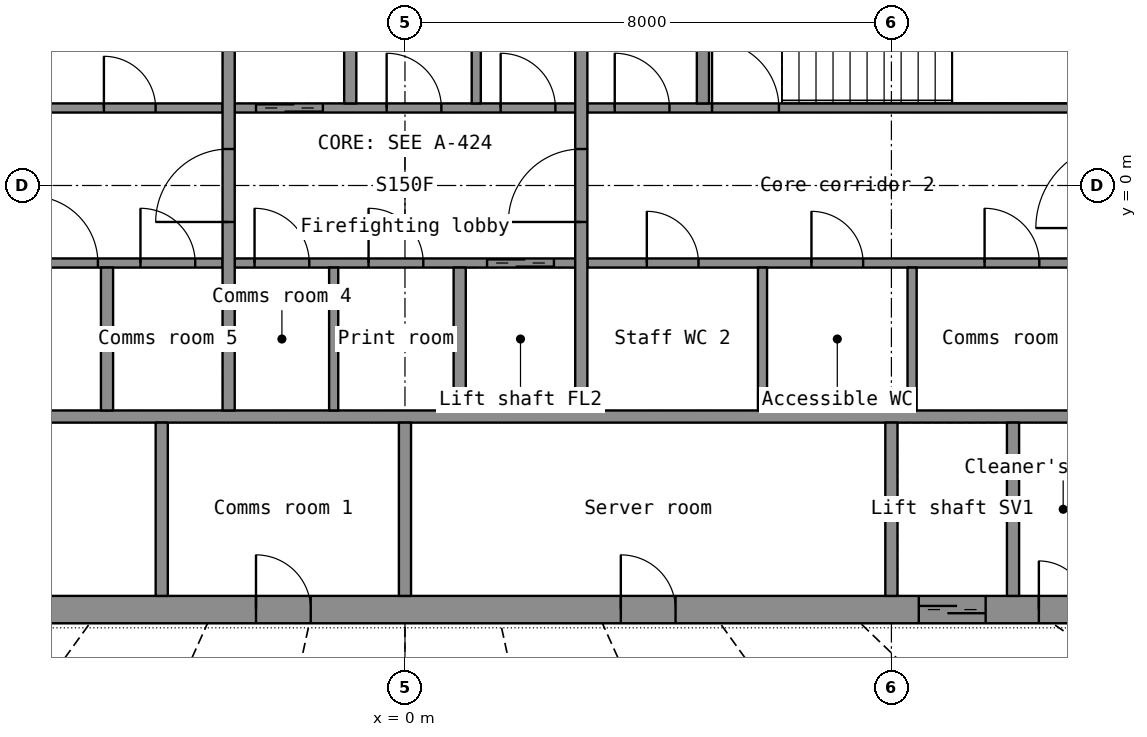
"""IFC4 building model, lengths in metres.
Left out: names, types, materials, properties, quantities, classifications, styles, units other than length and angle.
Written with IfcOpenShell. Run it as: python <this file> out.ifc"""

import sys

from ifc_helpers import new_model, si_unit, direction, frame, frame_2d, origin, place, context, subcontext, project, spatial, rectangle, extrude, element, fill, save


model = new_model("IFC4")
c1 = context("Model", 3, precision=1e-05, world=origin(), true_north=direction((0.0, 1.0)))
c2 = subcontext(c1, "Body", "Model", "MODEL_VIEW")
j1 = project(units=[si_unit("LENGTHUNIT", "METRE"), si_unit("PLANEANGLEUNIT", "RADIAN")], contexts=[c1])
p1 = place(None, origin())
s1 = spatial("IfcSite", under=j1, at=p1, CompositionType="ELEMENT")
p2 = place(p1, origin())
s2 = spatial("IfcBuilding", under=s1, at=p2, CompositionType="ELEMENT")
p3 = place(p2, frame((0.0, 0.0, 186.7)))
s3 = spatial("IfcBuildingStorey", under=s2, at=p3, CompositionType="ELEMENT", Elevation=186.7)
p4 = place(p3, frame((-11.55, -6.975, 0.0), z_axis=(0.0, 0.0, 1.0), x_axis=(1.0, 0.0, 0.0)))
e1 = element("IfcWall", 1, at=p4, inside=s3, PredefinedType="SHEAR", context=c2, shape_type="SweptSolid", body=[
    extrude(rectangle(XDim=23.1, YDim=0.45, at=frame_2d((11.55, 0.0))), origin(), (0.0, 0.0, 1.0), 3.3),
])
p5 = place(p4, frame((20.0, 0.0, 0.0)))
e2 = element("IfcOpeningElement", 2, at=p5, cuts=e1, PredefinedType="OPENING", context=c2, shape_type="SweptSolid", body=[
    extrude(rectangle(XDim=1.1, YDim=2.2, at=frame_2d((0.55, 1.1))), frame((0.0, 0.235, 0.0), z_axis=(0.0, -1.0, 0.0), x_axis=(1.0, 0.0, 0.0)), (0.0, 0.0, 1.0), 0.47),
])
p6 = place(p4, frame((4.1, 0.0, 0.0)))
e3 = element("IfcOpeningElement", 3, at=p6, cuts=e1, PredefinedType="OPENING", context=c2, shape_type="SweptSolid", body=[
    extrude(rectangle(XDim=0.9, YDim=2.1, at=frame_2d((0.45, 1.05))), frame((0.0, 0.235, 0.0), z_axis=(0.0, -1.0, 0.0), x_axis=(1.0, 0.0, 0.0)), (0.0, 0.0, 1.0), 0.47),
])
p7 = place(p4, frame((9.1, 0.0, 0.0)))
e4 = element("IfcOpeningElement", 4, at=p7, cuts=e1, PredefinedType="OPENING", context=c2, shape_type="SweptSolid", body=[
    extrude(rectangle(XDim=0.9, YDim=2.1, at=frame_2d((0.45, 1.05))), frame((0.0, 0.235, 0.0), z_axis=(0.0, -1.0, 0.0), x_axis=(1.0, 0.0, 0.0)), (0.0, 0.0, 1.0), 0.47),
])
p8 = place(p4, frame((15.1, 0.0, 0.0)))
e5 = element("IfcOpeningElement", 5, at=p8, cuts=e1, PredefinedType="OPENING", context=c2, shape_type="SweptSolid", body=[
    extrude(rectangle(XDim=0.9, YDim=2.1, at=frame_2d((0.45, 1.05))), frame((0.0, 0.235, 0.0), z_axis=(0.0, -1.0, 0.0), x_axis=(1.0, 0.0, 0.0)), (0.0, 0.0, 1.0), 0.47),
])
p9 = place(p4, frame((0.325, 0.0, 0.0)))
e6 = element("IfcOpeningElement", 6, at=p9, cuts=e1, PredefinedType="OPENING", context=c2, shape_type="SweptSolid", body=[
    extrude(rectangle(XDim=0.8, YDim=2.05, at=frame_2d((0.4, 1.025))), frame((0.0, 0.235, 0.0), z_axis=(0.0, -1.0, 0.0), x_axis=(1.0, 0.0, 0.0)), (0.0, 0.0, 1.0), 0.47),
])
p10 = place(p4, frame((21.975, 0.0, 0.0)))
e7 = element("IfcOpeningElement", 7, at=p10, cuts=e1, PredefinedType="OPENING", context=c2, shape_type="SweptSolid", body=[
    extrude(rectangle(XDim=0.8, YDim=2.05, at=frame_2d((0.4, 1.025))), frame((0.0, 0.235, 0.0), z_axis=(0.0, -1.0, 0.0), x_axis=(1.0, 0.0, 0.0)), (0.0, 0.0, 1.0), 0.47),
])
p11 = place(p3, frame((-11.55, -3.8, 0.0), z_axis=(0.0, 0.0, 1.0), x_axis=(1.0, 0.0, 0.0)))
e8 = element("IfcWall", 8, at=p11, inside=s3, PredefinedType="SHEAR", context=c2, shape_type="SweptSolid", body=[
    extrude(rectangle(XDim=23.1, YDim=0.2, at=frame_2d((11.55, 0.0))), origin(), (0.0, 0.0, 1.0), 3.3),
])
for number, where, z_axis, x_axis in (
    (9, (8.0, -6.75, 0.0), (0.0, 0.0, 1.0), (0.0, 1.0, 0.0)),
    (10, (10.0, -6.75, 0.0), (0.0, 0.0, 1.0), (0.0, 1.0, 0.0)),
):
    element("IfcWall", number, at=place(p3, frame(where, z_axis=z_axis, x_axis=x_axis)), inside=s3, PredefinedType="SHEAR", context=c2, shape_type="SweptSolid", body=[
        extrude(rectangle(XDim=2.85, YDim=0.2, at=frame_2d((1.425, 0.0))), origin(), (0.0, 0.0, 1.0), 3.3),
    ])
for number, where, z_axis, x_axis in (
    (11, (-4.0, -6.75, 0.0), (0.0, 0.0, 1.0), (0.0, 1.0, 0.0)),
    (12, (0.0, -6.75, 0.0), (0.0, 0.0, 1.0), (0.0, 1.0, 0.0)),
):
    element("IfcWall", number, at=place(p3, frame(where, z_axis=z_axis, x_axis=x_axis)), inside=s3, PredefinedType="PARTITIONING", context=c2, shape_type="SweptSolid", body=[
        extrude(rectangle(XDim=2.85, YDim=0.2, at=frame_2d((1.425, 0.0))), origin(), (0.0, 0.0, 1.0), 3.3),
    ])
p12 = place(p3, frame((-11.55, -1.275, 0.0), z_axis=(0.0, 0.0, 1.0), x_axis=(1.0, 0.0, 0.0)))
e13 = element("IfcWall", 13, at=p12, inside=s3, PredefinedType="SHEAR", context=c2, shape_type="SweptSolid", body=[
    extrude(rectangle(XDim=8.55, YDim=0.15, at=frame_2d((4.275, 0.0))), origin(), (0.0, 0.0, 1.0), 3.3),
])
p13 = place(p12, frame((5.4, 0.0, 0.0)))
e14 = element("IfcOpeningElement", 14, at=p13, cuts=e13, PredefinedType="OPENING", context=c2, shape_type="SweptSolid", body=[
    extrude(rectangle(XDim=1.1, YDim=2.15, at=frame_2d((0.55, 1.075))), frame((0.0, 0.085, 0.0), z_axis=(0.0, -1.0, 0.0), x_axis=(1.0, 0.0, 0.0)), (0.0, 0.0, 1.0), 0.17),
])
p14 = place(p12, frame((7.2, 0.0, 0.0)))
e15 = element("IfcOpeningElement", 15, at=p14, cuts=e13, PredefinedType="OPENING", context=c2, shape_type="SweptSolid", body=[
    extrude(rectangle(XDim=0.9, YDim=2.1, at=frame_2d((0.45, 1.05))), frame((0.0, 0.085, 0.0), z_axis=(0.0, -1.0, 0.0), x_axis=(1.0, 0.0, 0.0)), (0.0, 0.0, 1.0), 0.17),
])
p15 = place(p3, frame((-2.8, -1.275, 0.0), z_axis=(0.0, 0.0, 1.0), x_axis=(1.0, 0.0, 0.0)))
e16 = element("IfcWall", 16, at=p15, inside=s3, PredefinedType="SHEAR", context=c2, shape_type="SweptSolid", body=[
    extrude(rectangle(XDim=5.6, YDim=0.15, at=frame_2d((2.8, 0.0))), origin(), (0.0, 0.0, 1.0), 3.3),
])
p16 = place(p15, frame((4.15, 0.0, 0.0)))
e17 = element("IfcOpeningElement", 17, at=p16, cuts=e16, PredefinedType="OPENING", context=c2, shape_type="SweptSolid", body=[
    extrude(rectangle(XDim=1.1, YDim=2.2, at=frame_2d((0.55, 1.1))), frame((0.0, 0.085, 0.0), z_axis=(0.0, -1.0, 0.0), x_axis=(1.0, 0.0, 0.0)), (0.0, 0.0, 1.0), 0.17),
])
p17 = place(p15, frame((0.326, 0.0, 0.0)))
e18 = element("IfcOpeningElement", 18, at=p17, cuts=e16, PredefinedType="OPENING", context=c2, shape_type="SweptSolid", body=[
    extrude(rectangle(XDim=0.9, YDim=2.1, at=frame_2d((0.45, 1.05))), frame((0.0, 0.085, 0.0), z_axis=(0.0, -1.0, 0.0), x_axis=(1.0, 0.0, 0.0)), (0.0, 0.0, 1.0), 0.17),
])
p18 = place(p15, frame((2.201, 0.0, 0.0)))
e19 = element("IfcOpeningElement", 19, at=p18, cuts=e16, PredefinedType="OPENING", context=c2, shape_type="SweptSolid", body=[
    extrude(rectangle(XDim=0.9, YDim=2.1, at=frame_2d((0.45, 1.05))), frame((0.0, 0.085, 0.0), z_axis=(0.0, -1.0, 0.0), x_axis=(1.0, 0.0, 0.0)), (0.0, 0.0, 1.0), 0.17),
])
p19 = place(p3, frame((3.0, -1.275, 0.0), z_axis=(0.0, 0.0, 1.0), x_axis=(1.0, 0.0, 0.0)))
e20 = element("IfcWall", 20, at=p19, inside=s3, PredefinedType="PARTITIONING", context=c2, shape_type="SweptSolid", body=[
    extrude(rectangle(XDim=8.55, YDim=0.15, at=frame_2d((4.275, 0.0))), origin(), (0.0, 0.0, 1.0), 3.3),
])
p20 = place(p19, frame((0.978, 0.0, 0.0)))
e21 = element("IfcOpeningElement", 21, at=p20, cuts=e20, PredefinedType="OPENING", context=c2, shape_type="SweptSolid", body=[
    extrude(rectangle(XDim=0.85, YDim=2.1, at=frame_2d((0.425, 1.05))), frame((0.0, 0.085, 0.0), z_axis=(0.0, -1.0, 0.0), x_axis=(1.0, 0.0, 0.0)), (0.0, 0.0, 1.0), 0.17),
])
p21 = place(p19, frame((3.685, 0.0, 0.0)))
e22 = element("IfcOpeningElement", 22, at=p21, cuts=e20, PredefinedType="OPENING", context=c2, shape_type="SweptSolid", body=[
    extrude(rectangle(XDim=0.85, YDim=2.1, at=frame_2d((0.425, 1.05))), frame((0.0, 0.085, 0.0), z_axis=(0.0, -1.0, 0.0), x_axis=(1.0, 0.0, 0.0)), (0.0, 0.0, 1.0), 0.17),
])
p22 = place(p19, frame((6.532, 0.0, 0.0)))
e23 = element("IfcOpeningElement", 23, at=p22, cuts=e20, PredefinedType="OPENING", context=c2, shape_type="SweptSolid", body=[
    extrude(rectangle(XDim=0.9, YDim=2.1, at=frame_2d((0.45, 1.05))), frame((0.0, 0.085, 0.0), z_axis=(0.0, -1.0, 0.0), x_axis=(1.0, 0.0, 0.0)), (0.0, 0.0, 1.0), 0.17),
])
p23 = place(p3, frame((-11.55, 1.275, 0.0), z_axis=(0.0, 0.0, 1.0), x_axis=(1.0, 0.0, 0.0)))
e24 = element("IfcWall", 24, at=p23, inside=s3, PredefinedType="PARTITIONING", context=c2, shape_type="SweptSolid", body=[
    extrude(rectangle(XDim=8.55, YDim=0.15, at=frame_2d((4.275, 0.0))), origin(), (0.0, 0.0, 1.0), 3.3),
])
p24 = place(p23, frame((0.623, 0.0, 0.0)))
e25 = element("IfcOpeningElement", 25, at=p24, cuts=e24, PredefinedType="OPENING", context=c2, shape_type="SweptSolid", body=[
    extrude(rectangle(XDim=0.9, YDim=2.1, at=frame_2d((0.45, 1.05))), frame((0.0, 0.085, 0.0), z_axis=(0.0, -1.0, 0.0), x_axis=(1.0, 0.0, 0.0)), (0.0, 0.0, 1.0), 0.17),
])
p25 = place(p23, frame((3.396, 0.0, 0.0)))
e26 = element("IfcOpeningElement", 26, at=p25, cuts=e24, PredefinedType="OPENING", context=c2, shape_type="SweptSolid", body=[
    extrude(rectangle(XDim=0.85, YDim=2.1, at=frame_2d((0.425, 1.05))), frame((0.0, 0.085, 0.0), z_axis=(0.0, -1.0, 0.0), x_axis=(1.0, 0.0, 0.0)), (0.0, 0.0, 1.0), 0.17),
])
p26 = place(p23, frame((6.599, 0.0, 0.0)))
e27 = element("IfcOpeningElement", 27, at=p26, cuts=e24, PredefinedType="OPENING", context=c2, shape_type="SweptSolid", body=[
    extrude(rectangle(XDim=0.85, YDim=2.1, at=frame_2d((0.425, 1.05))), frame((0.0, 0.085, 0.0), z_axis=(0.0, -1.0, 0.0), x_axis=(1.0, 0.0, 0.0)), (0.0, 0.0, 1.0), 0.17),
])
p27 = place(p3, frame((-2.8, 1.275, 0.0), z_axis=(0.0, 0.0, 1.0), x_axis=(1.0, 0.0, 0.0)))
e28 = element("IfcWall", 28, at=p27, inside=s3, PredefinedType="SHEAR", context=c2, shape_type="SweptSolid", body=[
    extrude(rectangle(XDim=5.6, YDim=0.15, at=frame_2d((2.8, 0.0))), origin(), (0.0, 0.0, 1.0), 3.3),
])
p28 = place(p27, frame((0.35, 0.0, 0.0)))
e29 = element("IfcOpeningElement", 29, at=p28, cuts=e28, PredefinedType="OPENING", context=c2, shape_type="SweptSolid", body=[
    extrude(rectangle(XDim=1.1, YDim=2.2, at=frame_2d((0.55, 1.1))), frame((0.0, 0.085, 0.0), z_axis=(0.0, -1.0, 0.0), x_axis=(1.0, 0.0, 0.0)), (0.0, 0.0, 1.0), 0.17),
])
p29 = place(p27, frame((2.499, 0.0, 0.0)))
e30 = element("IfcOpeningElement", 30, at=p29, cuts=e28, PredefinedType="OPENING", context=c2, shape_type="SweptSolid", body=[
    extrude(rectangle(XDim=0.9, YDim=2.1, at=frame_2d((0.45, 1.05))), frame((0.0, 0.085, 0.0), z_axis=(0.0, -1.0, 0.0), x_axis=(1.0, 0.0, 0.0)), (0.0, 0.0, 1.0), 0.17),
])
p30 = place(p27, frame((4.374, 0.0, 0.0)))
e31 = element("IfcOpeningElement", 31, at=p30, cuts=e28, PredefinedType="OPENING", context=c2, shape_type="SweptSolid", body=[
    extrude(rectangle(XDim=0.9, YDim=2.1, at=frame_2d((0.45, 1.05))), frame((0.0, 0.085, 0.0), z_axis=(0.0, -1.0, 0.0), x_axis=(1.0, 0.0, 0.0)), (0.0, 0.0, 1.0), 0.17),
])
p31 = place(p3, frame((3.0, 1.275, 0.0), z_axis=(0.0, 0.0, 1.0), x_axis=(1.0, 0.0, 0.0)))
e32 = element("IfcWall", 32, at=p31, inside=s3, PredefinedType="SHEAR", context=c2, shape_type="SweptSolid", body=[
    extrude(rectangle(XDim=8.55, YDim=0.15, at=frame_2d((4.275, 0.0))), origin(), (0.0, 0.0, 1.0), 3.3),
])
p32 = place(p31, frame((2.05, 0.0, 0.0)))
e33 = element("IfcOpeningElement", 33, at=p32, cuts=e32, PredefinedType="OPENING", context=c2, shape_type="SweptSolid", body=[
    extrude(rectangle(XDim=1.1, YDim=2.15, at=frame_2d((0.55, 1.075))), frame((0.0, 0.085, 0.0), z_axis=(0.0, -1.0, 0.0), x_axis=(1.0, 0.0, 0.0)), (0.0, 0.0, 1.0), 0.17),
])
p33 = place(p31, frame((0.45, 0.0, 0.0)))
e34 = element("IfcOpeningElement", 34, at=p33, cuts=e32, PredefinedType="OPENING", context=c2, shape_type="SweptSolid", body=[
    extrude(rectangle(XDim=0.9, YDim=2.1, at=frame_2d((0.45, 1.05))), frame((0.0, 0.085, 0.0), z_axis=(0.0, -1.0, 0.0), x_axis=(1.0, 0.0, 0.0)), (0.0, 0.0, 1.0), 0.17),
])
p34 = place(p3, frame((-2.9, -3.7, 0.0), z_axis=(0.0, 0.0, 1.0), x_axis=(0.0, 1.0, 0.0)))
e35 = element("IfcWall", 35, at=p34, inside=s3, PredefinedType="SHEAR", context=c2, shape_type="SweptSolid", body=[
    extrude(rectangle(XDim=7.4, YDim=0.2, at=frame_2d((3.7, 0.0))), origin(), (0.0, 0.0, 1.0), 3.3),
])
p35 = place(p34, frame((3.1, 0.0, 0.0)))
e36 = element("IfcOpeningElement", 36, at=p35, cuts=e35, PredefinedType="OPENING", context=c2, shape_type="SweptSolid", body=[
    extrude(rectangle(XDim=1.2, YDim=2.2, at=frame_2d((0.6, 1.1))), frame((0.0, 0.11, 0.0), z_axis=(0.0, -1.0, 0.0), x_axis=(1.0, 0.0, 0.0)), (0.0, 0.0, 1.0), 0.22),
])
p36 = place(p3, frame((2.9, -3.7, 0.0), z_axis=(0.0, 0.0, 1.0), x_axis=(0.0, 1.0, 0.0)))
e37 = element("IfcWall", 37, at=p36, inside=s3, PredefinedType="SHEAR", context=c2, shape_type="SweptSolid", body=[
    extrude(rectangle(XDim=7.4, YDim=0.2, at=frame_2d((3.7, 0.0))), origin(), (0.0, 0.0, 1.0), 3.3),
])
p37 = place(p36, frame((3.1, 0.0, 0.0)))
e38 = element("IfcOpeningElement", 38, at=p37, cuts=e37, PredefinedType="OPENING", context=c2, shape_type="SweptSolid", body=[
    extrude(rectangle(XDim=1.2, YDim=2.2, at=frame_2d((0.6, 1.1))), frame((0.0, 0.11, 0.0), z_axis=(0.0, -1.0, 0.0), x_axis=(1.0, 0.0, 0.0)), (0.0, 0.0, 1.0), 0.22),
])
for number, where, z_axis, x_axis in (
    (39, (-0.9, 1.35, 0.0), (0.0, 0.0, 1.0), (0.0, 1.0, 0.0)),
    (40, (0.9, -3.7, 0.0), (0.0, 0.0, 1.0), (0.0, 1.0, 0.0)),
    (41, (-4.9, -3.7, 0.0), (0.0, 0.0, 1.0), (0.0, 1.0, 0.0)),
    (42, (4.9, 1.35, 0.0), (0.0, 0.0, 1.0), (0.0, 1.0, 0.0)),
):
    element("IfcWall", number, at=place(p3, frame(where, z_axis=z_axis, x_axis=x_axis)), inside=s3, PredefinedType="SHEAR", context=c2, shape_type="SweptSolid", body=[
        extrude(rectangle(XDim=2.35, YDim=0.2, at=frame_2d((1.175, 0.0))), origin(), (0.0, 0.0, 1.0), 3.3),
    ])
for number, where, z_axis, x_axis in (
    (43, (5.88, -3.7, 0.0), (0.0, 0.0, 1.0), (0.0, 1.0, 0.0)),
    (44, (8.34, -3.7, 0.0), (0.0, 0.0, 1.0), (0.0, 1.0, 0.0)),
    (45, (1.173, 1.35, 0.0), (0.0, 0.0, 1.0), (0.0, 1.0, 0.0)),
    (46, (-1.173, -3.7, 0.0), (0.0, 0.0, 1.0), (0.0, 1.0, 0.0)),
):
    element("IfcWall", number, at=place(p3, frame(where, z_axis=z_axis, x_axis=x_axis)), inside=s3, PredefinedType="PARTITIONING", context=c2, shape_type="SweptSolid", body=[
        extrude(rectangle(XDim=2.35, YDim=0.15, at=frame_2d((1.175, 0.0))), origin(), (0.0, 0.0, 1.0), 3.3),
    ])
p38 = place(p5, origin())
e47 = element("IfcDoor", 47, at=p38, inside=s3, OperationType="DOUBLE_DOOR_SLIDING", PredefinedType="DOOR", context=c2, shape_type="SweptSolid", body=[
    extrude(rectangle(XDim=1.1, YDim=2.2, at=frame_2d((0.55, 1.1))), frame((0.0, 0.025, 0.0), z_axis=(0.0, -1.0, 0.0), x_axis=(1.0, 0.0, 0.0)), (0.0, 0.0, 1.0), 0.05),
])
fill(e2, e47)
p39 = place(p7, origin())
e48 = element("IfcDoor", 48, at=p39, inside=s3, OperationType="SINGLE_SWING_LEFT", PredefinedType="DOOR", context=c2, shape_type="SweptSolid", body=[
    extrude(rectangle(XDim=0.9, YDim=2.1, at=frame_2d((0.45, 1.05))), frame((0.0, 0.025, 0.0), z_axis=(0.0, -1.0, 0.0), x_axis=(1.0, 0.0, 0.0)), (0.0, 0.0, 1.0), 0.05),
])
fill(e4, e48)
p40 = place(p8, origin())
e49 = element("IfcDoor", 49, at=p40, inside=s3, OperationType="SINGLE_SWING_LEFT", PredefinedType="DOOR", context=c2, shape_type="SweptSolid", body=[
    extrude(rectangle(XDim=0.9, YDim=2.1, at=frame_2d((0.45, 1.05))), frame((0.0, 0.025, 0.0), z_axis=(0.0, -1.0, 0.0), x_axis=(1.0, 0.0, 0.0)), (0.0, 0.0, 1.0), 0.05),
])
fill(e5, e49)
p41 = place(p10, origin())
e50 = element("IfcDoor", 50, at=p41, inside=s3, OperationType="SINGLE_SWING_LEFT", PredefinedType="DOOR", context=c2, shape_type="SweptSolid", body=[
    extrude(rectangle(XDim=0.8, YDim=2.05, at=frame_2d((0.4, 1.025))), frame((0.0, 0.025, 0.0), z_axis=(0.0, -1.0, 0.0), x_axis=(1.0, 0.0, 0.0)), (0.0, 0.0, 1.0), 0.05),
])
fill(e7, e50)
p42 = place(p35, origin())
e51 = element("IfcDoor", 51, at=p42, inside=s3, OperationType="SINGLE_SWING_LEFT", PredefinedType="DOOR", context=c2, shape_type="SweptSolid", body=[
    extrude(rectangle(XDim=1.2, YDim=2.2, at=frame_2d((0.6, 1.1))), frame((0.0, 0.025, 0.0), z_axis=(0.0, -1.0, 0.0), x_axis=(1.0, 0.0, 0.0)), (0.0, 0.0, 1.0), 0.05),
])
fill(e36, e51)
p43 = place(p37, origin())
e52 = element("IfcDoor", 52, at=p43, inside=s3, OperationType="SINGLE_SWING_LEFT", PredefinedType="DOOR", context=c2, shape_type="SweptSolid", body=[
    extrude(rectangle(XDim=1.2, YDim=2.2, at=frame_2d((0.6, 1.1))), frame((0.0, 0.025, 0.0), z_axis=(0.0, -1.0, 0.0), x_axis=(1.0, 0.0, 0.0)), (0.0, 0.0, 1.0), 0.05),
])
fill(e38, e52)
p44 = place(p28, origin())
e53 = element("IfcDoor", 53, at=p44, inside=s3, OperationType="DOUBLE_DOOR_SLIDING", PredefinedType="DOOR", context=c2, shape_type="SweptSolid", body=[
    extrude(rectangle(XDim=1.1, YDim=2.2, at=frame_2d((0.55, 1.1))), frame((0.0, 0.025, 0.0), z_axis=(0.0, -1.0, 0.0), x_axis=(1.0, 0.0, 0.0)), (0.0, 0.0, 1.0), 0.05),
])
fill(e29, e53)
p45 = place(p16, origin())
e54 = element("IfcDoor", 54, at=p45, inside=s3, OperationType="DOUBLE_DOOR_SLIDING", PredefinedType="DOOR", context=c2, shape_type="SweptSolid", body=[
    extrude(rectangle(XDim=1.1, YDim=2.2, at=frame_2d((0.55, 1.1))), frame((0.0, 0.025, 0.0), z_axis=(0.0, -1.0, 0.0), x_axis=(1.0, 0.0, 0.0)), (0.0, 0.0, 1.0), 0.05),
])
fill(e17, e54)
p46 = place(p13, origin())
e55 = element("IfcDoor", 55, at=p46, inside=s3, OperationType="SINGLE_SWING_LEFT", PredefinedType="DOOR", context=c2, shape_type="SweptSolid", body=[
    extrude(rectangle(XDim=1.1, YDim=2.15, at=frame_2d((0.55, 1.075))), frame((0.0, 0.025, 0.0), z_axis=(0.0, -1.0, 0.0), x_axis=(1.0, 0.0, 0.0)), (0.0, 0.0, 1.0), 0.05),
])
fill(e14, e55)
p47 = place(p32, origin())
e56 = element("IfcDoor", 56, at=p47, inside=s3, OperationType="SINGLE_SWING_LEFT", PredefinedType="DOOR", context=c2, shape_type="SweptSolid", body=[
    extrude(rectangle(XDim=1.1, YDim=2.15, at=frame_2d((0.55, 1.075))), frame((0.0, 0.025, 0.0), z_axis=(0.0, -1.0, 0.0), x_axis=(1.0, 0.0, 0.0)), (0.0, 0.0, 1.0), 0.05),
])
fill(e33, e56)
p48 = place(p26, origin())
e57 = element("IfcDoor", 57, at=p48, inside=s3, OperationType="SINGLE_SWING_LEFT", PredefinedType="DOOR", context=c2, shape_type="SweptSolid", body=[
    extrude(rectangle(XDim=0.85, YDim=2.1, at=frame_2d((0.425, 1.05))), frame((0.0, 0.025, 0.0), z_axis=(0.0, -1.0, 0.0), x_axis=(1.0, 0.0, 0.0)), (0.0, 0.0, 1.0), 0.05),
])
fill(e27, e57)
p49 = place(p20, origin())
e58 = element("IfcDoor", 58, at=p49, inside=s3, OperationType="SINGLE_SWING_LEFT", PredefinedType="DOOR", context=c2, shape_type="SweptSolid", body=[
    extrude(rectangle(XDim=0.85, YDim=2.1, at=frame_2d((0.425, 1.05))), frame((0.0, 0.025, 0.0), z_axis=(0.0, -1.0, 0.0), x_axis=(1.0, 0.0, 0.0)), (0.0, 0.0, 1.0), 0.05),
])
fill(e21, e58)
p50 = place(p21, origin())
e59 = element("IfcDoor", 59, at=p50, inside=s3, OperationType="SINGLE_SWING_LEFT", PredefinedType="DOOR", context=c2, shape_type="SweptSolid", body=[
    extrude(rectangle(XDim=0.85, YDim=2.1, at=frame_2d((0.425, 1.05))), frame((0.0, 0.025, 0.0), z_axis=(0.0, -1.0, 0.0), x_axis=(1.0, 0.0, 0.0)), (0.0, 0.0, 1.0), 0.05),
])
fill(e22, e59)
p51 = place(p22, origin())
e60 = element("IfcDoor", 60, at=p51, inside=s3, OperationType="SINGLE_SWING_LEFT", PredefinedType="DOOR", context=c2, shape_type="SweptSolid", body=[
    extrude(rectangle(XDim=0.9, YDim=2.1, at=frame_2d((0.45, 1.05))), frame((0.0, 0.025, 0.0), z_axis=(0.0, -1.0, 0.0), x_axis=(1.0, 0.0, 0.0)), (0.0, 0.0, 1.0), 0.05),
])
fill(e23, e60)
p52 = place(p29, origin())
e61 = element("IfcDoor", 61, at=p52, inside=s3, OperationType="SINGLE_SWING_LEFT", PredefinedType="DOOR", context=c2, shape_type="SweptSolid", body=[
    extrude(rectangle(XDim=0.9, YDim=2.1, at=frame_2d((0.45, 1.05))), frame((0.0, 0.025, 0.0), z_axis=(0.0, -1.0, 0.0), x_axis=(1.0, 0.0, 0.0)), (0.0, 0.0, 1.0), 0.05),
])
fill(e30, e61)
p53 = place(p30, origin())
e62 = element("IfcDoor", 62, at=p53, inside=s3, OperationType="SINGLE_SWING_LEFT", PredefinedType="DOOR", context=c2, shape_type="SweptSolid", body=[
    extrude(rectangle(XDim=0.9, YDim=2.1, at=frame_2d((0.45, 1.05))), frame((0.0, 0.025, 0.0), z_axis=(0.0, -1.0, 0.0), x_axis=(1.0, 0.0, 0.0)), (0.0, 0.0, 1.0), 0.05),
])
fill(e31, e62)
p54 = place(p17, origin())
e63 = element("IfcDoor", 63, at=p54, inside=s3, OperationType="SINGLE_SWING_LEFT", PredefinedType="DOOR", context=c2, shape_type="SweptSolid", body=[
    extrude(rectangle(XDim=0.9, YDim=2.1, at=frame_2d((0.45, 1.05))), frame((0.0, 0.025, 0.0), z_axis=(0.0, -1.0, 0.0), x_axis=(1.0, 0.0, 0.0)), (0.0, 0.0, 1.0), 0.05),
])
fill(e18, e63)
p55 = place(p18, origin())
e64 = element("IfcDoor", 64, at=p55, inside=s3, OperationType="SINGLE_SWING_LEFT", PredefinedType="DOOR", context=c2, shape_type="SweptSolid", body=[
    extrude(rectangle(XDim=0.9, YDim=2.1, at=frame_2d((0.45, 1.05))), frame((0.0, 0.025, 0.0), z_axis=(0.0, -1.0, 0.0), x_axis=(1.0, 0.0, 0.0)), (0.0, 0.0, 1.0), 0.05),
])
fill(e19, e64)
p56 = place(p33, origin())
e65 = element("IfcDoor", 65, at=p56, inside=s3, OperationType="SINGLE_SWING_LEFT", PredefinedType="DOOR", context=c2, shape_type="SweptSolid", body=[
    extrude(rectangle(XDim=0.9, YDim=2.1, at=frame_2d((0.45, 1.05))), frame((0.0, 0.025, 0.0), z_axis=(0.0, -1.0, 0.0), x_axis=(1.0, 0.0, 0.0)), (0.0, 0.0, 1.0), 0.05),
])
fill(e34, e65)
p57 = place(p14, origin())
e66 = element("IfcDoor", 66, at=p57, inside=s3, OperationType="SINGLE_SWING_LEFT", PredefinedType="DOOR", context=c2, shape_type="SweptSolid", body=[
    extrude(rectangle(XDim=0.9, YDim=2.1, at=frame_2d((0.45, 1.05))), frame((0.0, 0.025, 0.0), z_axis=(0.0, -1.0, 0.0), x_axis=(1.0, 0.0, 0.0)), (0.0, 0.0, 1.0), 0.05),
])
fill(e15, e66)
save(model, sys.argv[1])
